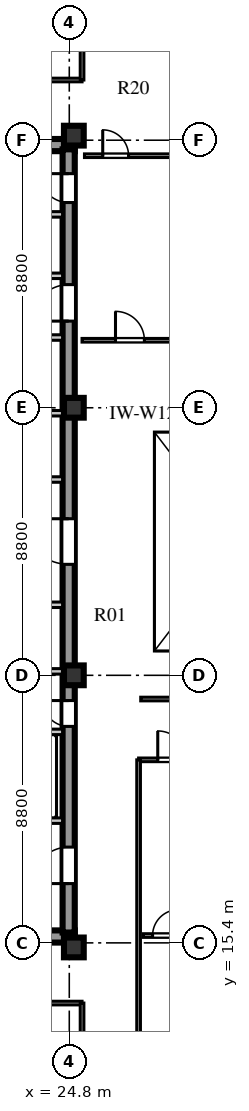
"""IFC4 building model, lengths in metres.
Left out: names, types, materials, properties, quantities, classifications, styles, units other than length and angle.
Written with IfcOpenShell. Run it as: python <this file> out.ifc"""

import sys

from ifc_helpers import new_model, si_unit, direction, frame, frame_2d, origin, origin_2d, place, context, subcontext, project, spatial, rectangle, extrude, element, fill, save


model = new_model("IFC4")
c1 = context("Model", 3, precision=1e-05, world=origin(), true_north=direction((0.0, 1.0)))
c2 = subcontext(c1, "Body", "Model", "MODEL_VIEW")
j1 = project(units=[si_unit("LENGTHUNIT", "METRE"), si_unit("PLANEANGLEUNIT", "RADIAN")], contexts=[c1])
p1 = place(None, origin())
s1 = spatial("IfcSite", under=j1, at=p1, CompositionType="ELEMENT")
p2 = place(p1, origin())
s2 = spatial("IfcBuilding", under=s1, at=p2, CompositionType="ELEMENT")
p3 = place(p2, frame((0.0, 0.0, 288.2)))
s3 = spatial("IfcBuildingStorey", under=s2, at=p3, CompositionType="ELEMENT", Elevation=288.2)
for number, where, z_axis, x_axis in (
    (1, (15.5, 15.61, 0.0), (0.0, 0.0, 1.0), (1.0, 0.0, 0.0)),
    (2, (15.5, 41.64, 0.0), (0.0, 0.0, 1.0), (1.0, 0.0, 0.0)),
):
    element("IfcWall", number, at=place(p3, frame(where, z_axis=z_axis, x_axis=x_axis)), inside=s3, PredefinedType="SHEAR", context=c2, shape_type="SweptSolid", body=[
        extrude(rectangle(XDim=9.48, YDim=0.4, at=frame_2d((4.74, 0.0))), origin(), (0.0, 0.0, 1.0), 3.66),
    ])
p4 = place(p3, frame((24.78, 15.74, 0.0), z_axis=(0.0, 0.0, 1.0), x_axis=(0.0, 1.0, 0.0)))
e3 = element("IfcWall", 3, at=p4, inside=s3, PredefinedType="SHEAR", context=c2, shape_type="SweptSolid", body=[
    extrude(rectangle(XDim=25.76, YDim=0.4, at=frame_2d((12.88, 0.0))), origin(), (0.0, 0.0, 1.0), 3.66),
])
p5 = place(p4, frame((1.61, 0.0, 0.0)))
e4 = element("IfcOpeningElement", 4, at=p5, cuts=e3, PredefinedType="OPENING", context=c2, shape_type="SweptSolid", body=[
    extrude(rectangle(XDim=1.2, YDim=2.1, at=frame_2d((0.6, 1.05))), frame((0.0, 0.21, 0.0), z_axis=(0.0, -1.0, 0.0), x_axis=(1.0, 0.0, 0.0)), (0.0, 0.0, 1.0), 0.42),
])
p6 = place(p4, frame((6.78, 0.0, 0.0)))
e5 = element("IfcOpeningElement", 5, at=p6, cuts=e3, PredefinedType="OPENING", context=c2, shape_type="SweptSolid", body=[
    extrude(rectangle(XDim=0.85, YDim=2.06, at=frame_2d((0.425, 1.03))), frame((0.0, 0.21, 0.0), z_axis=(0.0, -1.0, 0.0), x_axis=(1.0, 0.0, 0.0)), (0.0, 0.0, 1.0), 0.42),
])
p7 = place(p4, frame((12.11, 0.0, 0.0)))
e6 = element("IfcOpeningElement", 6, at=p7, cuts=e3, PredefinedType="OPENING", context=c2, shape_type="SweptSolid", body=[
    extrude(rectangle(XDim=1.5, YDim=2.12, at=frame_2d((0.75, 1.06))), frame((0.0, 0.21, 0.0), z_axis=(0.0, -1.0, 0.0), x_axis=(1.0, 0.0, 0.0)), (0.0, 0.0, 1.0), 0.42),
])
p8 = place(p4, frame((20.11, 0.0, 0.0)))
e7 = element("IfcOpeningElement", 7, at=p8, cuts=e3, PredefinedType="OPENING", context=c2, shape_type="SweptSolid", body=[
    extrude(rectangle(XDim=1.2, YDim=2.12, at=frame_2d((0.6, 1.06))), frame((0.0, 0.21, 0.0), z_axis=(0.0, -1.0, 0.0), x_axis=(1.0, 0.0, 0.0)), (0.0, 0.0, 1.0), 0.42),
])
p9 = place(p4, frame((24.01, 0.0, 0.0)))
e8 = element("IfcOpeningElement", 8, at=p9, cuts=e3, PredefinedType="OPENING", context=c2, shape_type="SweptSolid", body=[
    extrude(rectangle(XDim=0.95, YDim=2.1, at=frame_2d((0.475, 1.05))), frame((0.0, 0.21, 0.0), z_axis=(0.0, -1.0, 0.0), x_axis=(1.0, 0.0, 0.0)), (0.0, 0.0, 1.0), 0.42),
])
for number, where, z_axis, x_axis in (
    (9, (24.95, 15.25, 0.0), (0.0, 0.0, 1.0), (1.0, 0.0, 0.0)),
    (10, (24.95, 24.2, 0.0), (0.0, 0.0, 1.0), (1.0, 0.0, 0.0)),
    (11, (24.95, 33.0, 0.0), (0.0, 0.0, 1.0), (1.0, 0.0, 0.0)),
    (12, (24.95, 41.95, 0.0), (0.0, 0.0, 1.0), (1.0, 0.0, 0.0)),
):
    element("IfcColumn", number, at=place(p3, frame(where, z_axis=z_axis, x_axis=x_axis)), inside=s3, PredefinedType="COLUMN", context=c2, shape_type="SweptSolid", body=[
        extrude(rectangle(XDim=0.65, YDim=0.65, at=origin_2d()), origin(), (0.0, 0.0, 1.0), 3.66),
    ])
p10 = place(p3, frame((19.64, 19.42, 0.0), z_axis=(0.0, 0.0, 1.0), x_axis=(1.0, 0.0, 0.0)))
e13 = element("IfcWall", 13, at=p10, inside=s3, PredefinedType="SOLIDWALL", context=c2, shape_type="SweptSolid", body=[
    extrude(rectangle(XDim=4.94, YDim=0.18, at=frame_2d((2.47, 0.0))), origin(), (0.0, 0.0, 1.0), 3.66),
])
p11 = place(p10, frame((0.72, 0.0, 0.0)))
e14 = element("IfcOpeningElement", 14, at=p11, cuts=e13, PredefinedType="OPENING", context=c2, shape_type="SweptSolid", body=[
    extrude(rectangle(XDim=1.1, YDim=2.1, at=frame_2d((0.55, 1.05))), frame((0.0, 0.1, 0.0), z_axis=(0.0, -1.0, 0.0), x_axis=(1.0, 0.0, 0.0)), (0.0, 0.0, 1.0), 0.2),
])
p12 = place(p10, frame((3.02, 0.0, 0.0)))
e15 = element("IfcOpeningElement", 15, at=p12, cuts=e13, PredefinedType="OPENING", context=c2, shape_type="SweptSolid", body=[
    extrude(rectangle(XDim=1.1, YDim=2.1, at=frame_2d((0.55, 1.05))), frame((0.0, 0.1, 0.0), z_axis=(0.0, -1.0, 0.0), x_axis=(1.0, 0.0, 0.0)), (0.0, 0.0, 1.0), 0.2),
])
p13 = place(p3, frame((19.64, 22.34, 0.0), z_axis=(0.0, 0.0, 1.0), x_axis=(1.0, 0.0, 0.0)))
e16 = element("IfcWall", 16, at=p13, inside=s3, PredefinedType="SOLIDWALL", context=c2, shape_type="SweptSolid", body=[
    extrude(rectangle(XDim=4.94, YDim=0.18, at=frame_2d((2.47, 0.0))), origin(), (0.0, 0.0, 1.0), 3.66),
])
p14 = place(p3, frame((15.9, 26.52, 0.0), z_axis=(0.0, 0.0, 1.0), x_axis=(1.0, 0.0, 0.0)))
e17 = element("IfcWall", 17, at=p14, inside=s3, PredefinedType="SOLIDWALL", context=c2, shape_type="SweptSolid", body=[
    extrude(rectangle(XDim=8.68, YDim=0.18, at=frame_2d((4.34, 0.0))), origin(), (0.0, 0.0, 1.0), 3.66),
])
p15 = place(p14, frame((2.05, 0.0, 0.0)))
e18 = element("IfcOpeningElement", 18, at=p15, cuts=e17, PredefinedType="OPENING", context=c2, shape_type="SweptSolid", body=[
    extrude(rectangle(XDim=0.85, YDim=2.06, at=frame_2d((0.425, 1.03))), frame((0.0, 0.1, 0.0), z_axis=(0.0, -1.0, 0.0), x_axis=(1.0, 0.0, 0.0)), (0.0, 0.0, 1.0), 0.2),
])
p16 = place(p14, frame((5.2, 0.0, 0.0)))
e19 = element("IfcOpeningElement", 19, at=p16, cuts=e17, PredefinedType="OPENING", context=c2, shape_type="SweptSolid", body=[
    extrude(rectangle(XDim=0.95, YDim=2.1, at=frame_2d((0.475, 1.05))), frame((0.0, 0.1, 0.0), z_axis=(0.0, -1.0, 0.0), x_axis=(1.0, 0.0, 0.0)), (0.0, 0.0, 1.0), 0.2),
])
p17 = place(p3, frame((15.9, 24.33, 0.0), z_axis=(0.0, 0.0, 1.0), x_axis=(1.0, 0.0, 0.0)))
e20 = element("IfcWall", 20, at=p17, inside=s3, PredefinedType="SOLIDWALL", context=c2, shape_type="SweptSolid", body=[
    extrude(rectangle(XDim=8.68, YDim=0.18, at=frame_2d((4.34, 0.0))), origin(), (0.0, 0.0, 1.0), 3.06),
])
p18 = place(p3, frame((15.9, 30.64, 0.0), z_axis=(0.0, 0.0, 1.0), x_axis=(1.0, 0.0, 0.0)))
e21 = element("IfcWall", 21, at=p18, inside=s3, PredefinedType="SOLIDWALL", context=c2, shape_type="SweptSolid", body=[
    extrude(rectangle(XDim=8.68, YDim=0.18, at=frame_2d((4.34, 0.0))), origin(), (0.0, 0.0, 1.0), 3.66),
])
p19 = place(p18, frame((3.7, 0.0, 0.0)))
e22 = element("IfcOpeningElement", 22, at=p19, cuts=e21, PredefinedType="OPENING", context=c2, shape_type="SweptSolid", body=[
    extrude(rectangle(XDim=0.95, YDim=2.1, at=frame_2d((0.475, 1.05))), frame((0.0, 0.1, 0.0), z_axis=(0.0, -1.0, 0.0), x_axis=(1.0, 0.0, 0.0)), (0.0, 0.0, 1.0), 0.2),
])
p20 = place(p3, frame((15.9, 32.82, 0.0), z_axis=(0.0, 0.0, 1.0), x_axis=(1.0, 0.0, 0.0)))
e23 = element("IfcWall", 23, at=p20, inside=s3, PredefinedType="SOLIDWALL", context=c2, shape_type="SweptSolid", body=[
    extrude(rectangle(XDim=8.68, YDim=0.18, at=frame_2d((4.34, 0.0))), origin(), (0.0, 0.0, 1.0), 3.06),
])
p21 = place(p3, frame((22.02, 35.31, 0.0), z_axis=(0.0, 0.0, 1.0), x_axis=(1.0, 0.0, 0.0)))
e24 = element("IfcWall", 24, at=p21, inside=s3, PredefinedType="SOLIDWALL", context=c2, shape_type="SweptSolid", body=[
    extrude(rectangle(XDim=2.56, YDim=0.18, at=frame_2d((1.28, 0.0))), origin(), (0.0, 0.0, 1.0), 3.66),
])
p22 = place(p21, frame((0.55, 0.0, 0.0)))
e25 = element("IfcOpeningElement", 25, at=p22, cuts=e24, PredefinedType="OPENING", context=c2, shape_type="SweptSolid", body=[
    extrude(rectangle(XDim=1.0, YDim=2.1, at=frame_2d((0.5, 1.05))), frame((0.0, 0.1, 0.0), z_axis=(0.0, -1.0, 0.0), x_axis=(1.0, 0.0, 0.0)), (0.0, 0.0, 1.0), 0.2),
])
p23 = place(p3, frame((19.64, 37.34, 0.0), z_axis=(0.0, 0.0, 1.0), x_axis=(1.0, 0.0, 0.0)))
e26 = element("IfcWall", 26, at=p23, inside=s3, PredefinedType="SOLIDWALL", context=c2, shape_type="SweptSolid", body=[
    extrude(rectangle(XDim=4.94, YDim=0.18, at=frame_2d((2.47, 0.0))), origin(), (0.0, 0.0, 1.0), 3.66),
])
p24 = place(p23, frame((0.45, 0.0, 0.0)))
e27 = element("IfcOpeningElement", 27, at=p24, cuts=e26, PredefinedType="OPENING", context=c2, shape_type="SweptSolid", body=[
    extrude(rectangle(XDim=1.0, YDim=2.1, at=frame_2d((0.5, 1.05))), frame((0.0, 0.1, 0.0), z_axis=(0.0, -1.0, 0.0), x_axis=(1.0, 0.0, 0.0)), (0.0, 0.0, 1.0), 0.2),
])
p25 = place(p23, frame((2.5, 0.0, 0.0)))
e28 = element("IfcOpeningElement", 28, at=p25, cuts=e26, PredefinedType="OPENING", context=c2, shape_type="SweptSolid", body=[
    extrude(rectangle(XDim=1.0, YDim=2.1, at=frame_2d((0.5, 1.05))), frame((0.0, 0.1, 0.0), z_axis=(0.0, -1.0, 0.0), x_axis=(1.0, 0.0, 0.0)), (0.0, 0.0, 1.0), 0.2),
])
p26 = place(p3, frame((19.64, 39.36, 0.0), z_axis=(0.0, 0.0, 1.0), x_axis=(1.0, 0.0, 0.0)))
e29 = element("IfcWall", 29, at=p26, inside=s3, PredefinedType="SOLIDWALL", context=c2, shape_type="SweptSolid", body=[
    extrude(rectangle(XDim=4.94, YDim=0.18, at=frame_2d((2.47, 0.0))), origin(), (0.0, 0.0, 1.0), 3.66),
])
p27 = place(p3, frame((27.08, 21.42, 0.0), z_axis=(0.0, 0.0, 1.0), x_axis=(1.0, 0.0, 0.0)))
e30 = element("IfcWall", 30, at=p27, inside=s3, PredefinedType="PARTITIONING", context=c2, shape_type="SweptSolid", body=[
    extrude(rectangle(XDim=12.07, YDim=0.12, at=frame_2d((6.035, 0.0))), origin(), (0.0, 0.0, 1.0), 3.36),
])
p28 = place(p27, frame((0.63, 0.0, 0.0)))
e31 = element("IfcOpeningElement", 31, at=p28, cuts=e30, PredefinedType="OPENING", context=c2, shape_type="SweptSolid", body=[
    extrude(rectangle(XDim=0.95, YDim=2.1, at=frame_2d((0.475, 1.05))), frame((0.0, 0.07, 0.0), z_axis=(0.0, -1.0, 0.0), x_axis=(1.0, 0.0, 0.0)), (0.0, 0.0, 1.0), 0.14),
])
p29 = place(p3, frame((27.08, 10.38, 0.0), z_axis=(0.0, 0.0, 1.0), x_axis=(0.0, 1.0, 0.0)))
e32 = element("IfcWall", 32, at=p29, inside=s3, PredefinedType="PARTITIONING", context=c2, shape_type="SweptSolid", body=[
    extrude(rectangle(XDim=11.04, YDim=0.12, at=frame_2d((5.52, 0.0))), origin(), (0.0, 0.0, 1.0), 3.66),
])
p30 = place(p3, frame((27.15, 23.42, 0.0), z_axis=(0.0, 0.0, 1.0), x_axis=(1.0, 0.0, 0.0)))
e33 = element("IfcWall", 33, at=p30, inside=s3, PredefinedType="PARTITIONING", context=c2, shape_type="SweptSolid", body=[
    extrude(rectangle(XDim=6.0, YDim=0.12, at=frame_2d((3.0, 0.0))), origin(), (0.0, 0.0, 1.0), 3.66),
])
p31 = place(p3, frame((25.22, 35.22, 0.0), z_axis=(0.0, 0.0, 1.0), x_axis=(1.0, 0.0, 0.0)))
e34 = element("IfcWall", 34, at=p31, inside=s3, PredefinedType="PARTITIONING", context=c2, shape_type="SweptSolid", body=[
    extrude(rectangle(XDim=9.5, YDim=0.12, at=frame_2d((4.75, 0.0))), origin(), (0.0, 0.0, 1.0), 3.66),
])
p32 = place(p31, frame((1.1, 0.0, 0.0)))
e35 = element("IfcOpeningElement", 35, at=p32, cuts=e34, PredefinedType="OPENING", context=c2, shape_type="SweptSolid", body=[
    extrude(rectangle(XDim=0.95, YDim=2.1, at=frame_2d((0.475, 1.05))), frame((0.0, 0.07, 0.0), z_axis=(0.0, -1.0, 0.0), x_axis=(1.0, 0.0, 0.0)), (0.0, 0.0, 1.0), 0.14),
])
p33 = place(p3, frame((13.8, 13.42, 0.0), z_axis=(0.0, 0.0, 1.0), x_axis=(1.0, 0.0, 0.0)))
e36 = element("IfcWall", 36, at=p33, inside=s3, PredefinedType="PARTITIONING", context=c2, shape_type="SweptSolid", body=[
    extrude(rectangle(XDim=11.42, YDim=0.12, at=frame_2d((5.71, 0.0))), origin(), (0.0, 0.0, 1.0), 3.66),
])
p34 = place(p33, frame((2.7, 0.0, 0.0)))
e37 = element("IfcOpeningElement", 37, at=p34, cuts=e36, PredefinedType="OPENING", context=c2, shape_type="SweptSolid", body=[
    extrude(rectangle(XDim=0.9, YDim=2.08, at=frame_2d((0.45, 1.04))), frame((0.0, 0.07, 0.0), z_axis=(0.0, -1.0, 0.0), x_axis=(1.0, 0.0, 0.0)), (0.0, 0.0, 1.0), 0.14),
])
p35 = place(p33, frame((6.67, 0.0, 0.0)))
e38 = element("IfcOpeningElement", 38, at=p35, cuts=e36, PredefinedType="OPENING", context=c2, shape_type="SweptSolid", body=[
    extrude(rectangle(XDim=0.9, YDim=2.08, at=frame_2d((0.45, 1.04))), frame((0.0, 0.07, 0.0), z_axis=(0.0, -1.0, 0.0), x_axis=(1.0, 0.0, 0.0)), (0.0, 0.0, 1.0), 0.14),
])
p36 = place(p3, frame((25.22, 10.38, 0.0), z_axis=(0.0, 0.0, 1.0), x_axis=(0.0, 1.0, 0.0)))
e39 = element("IfcWall", 39, at=p36, inside=s3, PredefinedType="PARTITIONING", context=c2, shape_type="SweptSolid", body=[
    extrude(rectangle(XDim=3.04, YDim=0.12, at=frame_2d((1.52, 0.0))), origin(), (0.0, 0.0, 1.0), 3.21),
])
p37 = place(p3, frame((13.8, 43.78, 0.0), z_axis=(0.0, 0.0, 1.0), x_axis=(1.0, 0.0, 0.0)))
e40 = element("IfcWall", 40, at=p37, inside=s3, PredefinedType="PARTITIONING", context=c2, shape_type="SweptSolid", body=[
    extrude(rectangle(XDim=11.42, YDim=0.12, at=frame_2d((5.71, 0.0))), origin(), (0.0, 0.0, 1.0), 3.66),
])
p38 = place(p37, frame((3.2, 0.0, 0.0)))
e41 = element("IfcOpeningElement", 41, at=p38, cuts=e40, PredefinedType="OPENING", context=c2, shape_type="SweptSolid", body=[
    extrude(rectangle(XDim=0.95, YDim=2.08, at=frame_2d((0.475, 1.04))), frame((0.0, 0.07, 0.0), z_axis=(0.0, -1.0, 0.0), x_axis=(1.0, 0.0, 0.0)), (0.0, 0.0, 1.0), 0.14),
])
p39 = place(p3, frame((25.22, 43.78, 0.0), z_axis=(0.0, 0.0, 1.0), x_axis=(0.0, 1.0, 0.0)))
e42 = element("IfcWall", 42, at=p39, inside=s3, PredefinedType="PARTITIONING", context=c2, shape_type="SweptSolid", body=[
    extrude(rectangle(XDim=3.04, YDim=0.12, at=frame_2d((1.52, 0.0))), origin(), (0.0, 0.0, 1.0), 3.21),
])
p40 = place(p3, frame((27.24, 15.641, 0.0), z_axis=(0.0, 0.0, 1.0), x_axis=(1.0, 0.0, 0.0)))
e43 = element("IfcWall", 43, at=p40, inside=s3, PredefinedType="PARTITIONING", context=c2, shape_type="SweptSolid", body=[
    extrude(rectangle(XDim=11.83, YDim=0.12, at=frame_2d((5.915, 0.0))), origin(), (0.0, 0.0, 1.0), 3.66),
])
p41 = place(p40, frame((0.3, 0.0, 0.0)))
e44 = element("IfcOpeningElement", 44, at=p41, cuts=e43, PredefinedType="OPENING", context=c2, shape_type="SweptSolid", body=[
    extrude(rectangle(XDim=0.85, YDim=2.08, at=frame_2d((0.425, 1.04))), frame((0.0, 0.07, 0.0), z_axis=(0.0, -1.0, 0.0), x_axis=(1.0, 0.0, 0.0)), (0.0, 0.0, 1.0), 0.14),
])
p42 = place(p40, frame((4.475, 0.0, 0.0)))
e45 = element("IfcOpeningElement", 45, at=p42, cuts=e43, PredefinedType="OPENING", context=c2, shape_type="SweptSolid", body=[
    extrude(rectangle(XDim=0.85, YDim=2.08, at=frame_2d((0.425, 1.04))), frame((0.0, 0.07, 0.0), z_axis=(0.0, -1.0, 0.0), x_axis=(1.0, 0.0, 0.0)), (0.0, 0.0, 1.0), 0.14),
])
p43 = place(p3, frame((25.3, 41.29, 0.0), z_axis=(0.0, 0.0, 1.0), x_axis=(1.0, 0.0, 0.0)))
e46 = element("IfcWall", 46, at=p43, inside=s3, PredefinedType="PARTITIONING", context=c2, shape_type="SweptSolid", body=[
    extrude(rectangle(XDim=9.34, YDim=0.12, at=frame_2d((4.67, 0.0))), origin(), (0.0, 0.0, 1.0), 3.66),
])
p44 = place(p43, frame((0.6, 0.0, 0.0)))
e47 = element("IfcOpeningElement", 47, at=p44, cuts=e46, PredefinedType="OPENING", context=c2, shape_type="SweptSolid", body=[
    extrude(rectangle(XDim=0.85, YDim=2.08, at=frame_2d((0.425, 1.04))), frame((0.0, 0.07, 0.0), z_axis=(0.0, -1.0, 0.0), x_axis=(1.0, 0.0, 0.0)), (0.0, 0.0, 1.0), 0.14),
])
p45 = place(p43, frame((3.573, 0.0, 0.0)))
e48 = element("IfcOpeningElement", 48, at=p45, cuts=e46, PredefinedType="OPENING", context=c2, shape_type="SweptSolid", body=[
    extrude(rectangle(XDim=0.85, YDim=2.08, at=frame_2d((0.425, 1.04))), frame((0.0, 0.07, 0.0), z_axis=(0.0, -1.0, 0.0), x_axis=(1.0, 0.0, 0.0)), (0.0, 0.0, 1.0), 0.14),
])
p46 = place(p5, frame((1.2, 0.0, 0.0), z_axis=(0.0, 0.0, 1.0), x_axis=(-1.0, 0.0, 0.0)))
e49 = element("IfcDoor", 49, at=p46, inside=s3, OperationType="SINGLE_SWING_RIGHT", PredefinedType="DOOR", context=c2, shape_type="SweptSolid", body=[
    extrude(rectangle(XDim=1.2, YDim=2.1, at=frame_2d((0.6, 1.05))), frame((0.0, 0.025, 0.0), z_axis=(0.0, -1.0, 0.0), x_axis=(1.0, 0.0, 0.0)), (0.0, 0.0, 1.0), 0.05),
])
fill(e4, e49)
p47 = place(p6, frame((0.85, 0.0, 0.0), z_axis=(0.0, 0.0, 1.0), x_axis=(-1.0, 0.0, 0.0)))
e50 = element("IfcDoor", 50, at=p47, inside=s3, OperationType="SINGLE_SWING_LEFT", PredefinedType="DOOR", context=c2, shape_type="SweptSolid", body=[
    extrude(rectangle(XDim=0.85, YDim=2.06, at=frame_2d((0.425, 1.03))), frame((0.0, 0.025, 0.0), z_axis=(0.0, -1.0, 0.0), x_axis=(1.0, 0.0, 0.0)), (0.0, 0.0, 1.0), 0.05),
])
fill(e5, e50)
p48 = place(p7, frame((1.5, 0.0, 0.0), z_axis=(0.0, 0.0, 1.0), x_axis=(-1.0, 0.0, 0.0)))
e51 = element("IfcDoor", 51, at=p48, inside=s3, OperationType="SINGLE_SWING_LEFT", PredefinedType="DOOR", context=c2, shape_type="SweptSolid", body=[
    extrude(rectangle(XDim=1.5, YDim=2.12, at=frame_2d((0.75, 1.06))), frame((0.0, 0.025, 0.0), z_axis=(0.0, -1.0, 0.0), x_axis=(1.0, 0.0, 0.0)), (0.0, 0.0, 1.0), 0.05),
])
fill(e6, e51)
p49 = place(p8, frame((1.2, 0.0, 0.0), z_axis=(0.0, 0.0, 1.0), x_axis=(-1.0, 0.0, 0.0)))
e52 = element("IfcDoor", 52, at=p49, inside=s3, OperationType="SINGLE_SWING_RIGHT", PredefinedType="DOOR", context=c2, shape_type="SweptSolid", body=[
    extrude(rectangle(XDim=1.2, YDim=2.12, at=frame_2d((0.6, 1.06))), frame((0.0, 0.025, 0.0), z_axis=(0.0, -1.0, 0.0), x_axis=(1.0, 0.0, 0.0)), (0.0, 0.0, 1.0), 0.05),
])
fill(e7, e52)
p50 = place(p9, frame((0.95, 0.0, 0.0), z_axis=(0.0, 0.0, 1.0), x_axis=(-1.0, 0.0, 0.0)))
e53 = element("IfcDoor", 53, at=p50, inside=s3, OperationType="SINGLE_SWING_LEFT", PredefinedType="DOOR", context=c2, shape_type="SweptSolid", body=[
    extrude(rectangle(XDim=0.95, YDim=2.1, at=frame_2d((0.475, 1.05))), frame((0.0, 0.025, 0.0), z_axis=(0.0, -1.0, 0.0), x_axis=(1.0, 0.0, 0.0)), (0.0, 0.0, 1.0), 0.05),
])
fill(e8, e53)
p51 = place(p41, frame((0.85, 0.0, 0.0), z_axis=(0.0, 0.0, 1.0), x_axis=(-1.0, 0.0, 0.0)))
e54 = element("IfcDoor", 54, at=p51, inside=s3, OperationType="SINGLE_SWING_LEFT", PredefinedType="DOOR", context=c2, shape_type="SweptSolid", body=[
    extrude(rectangle(XDim=0.85, YDim=2.08, at=frame_2d((0.425, 1.04))), frame((0.0, 0.025, 0.0), z_axis=(0.0, -1.0, 0.0), x_axis=(1.0, 0.0, 0.0)), (0.0, 0.0, 1.0), 0.05),
])
fill(e44, e54)
p52 = place(p28, frame((0.95, 0.0, 0.0), z_axis=(0.0, 0.0, 1.0), x_axis=(-1.0, 0.0, 0.0)))
e55 = element("IfcDoor", 55, at=p52, inside=s3, OperationType="SINGLE_SWING_RIGHT", PredefinedType="DOOR", context=c2, shape_type="SweptSolid", body=[
    extrude(rectangle(XDim=0.95, YDim=2.1, at=frame_2d((0.475, 1.05))), frame((0.0, 0.025, 0.0), z_axis=(0.0, -1.0, 0.0), x_axis=(1.0, 0.0, 0.0)), (0.0, 0.0, 1.0), 0.05),
])
fill(e31, e55)
p53 = place(p44, origin())
e56 = element("IfcDoor", 56, at=p53, inside=s3, OperationType="SINGLE_SWING_LEFT", PredefinedType="DOOR", context=c2, shape_type="SweptSolid", body=[
    extrude(rectangle(XDim=0.85, YDim=2.08, at=frame_2d((0.425, 1.04))), frame((0.0, 0.025, 0.0), z_axis=(0.0, -1.0, 0.0), x_axis=(1.0, 0.0, 0.0)), (0.0, 0.0, 1.0), 0.05),
])
fill(e47, e56)
p54 = place(p32, origin())
e57 = element("IfcDoor", 57, at=p54, inside=s3, OperationType="SINGLE_SWING_LEFT", PredefinedType="DOOR", context=c2, shape_type="SweptSolid", body=[
    extrude(rectangle(XDim=0.95, YDim=2.1, at=frame_2d((0.475, 1.05))), frame((0.0, 0.025, 0.0), z_axis=(0.0, -1.0, 0.0), x_axis=(1.0, 0.0, 0.0)), (0.0, 0.0, 1.0), 0.05),
])
fill(e35, e57)
save(model, sys.argv[1])
